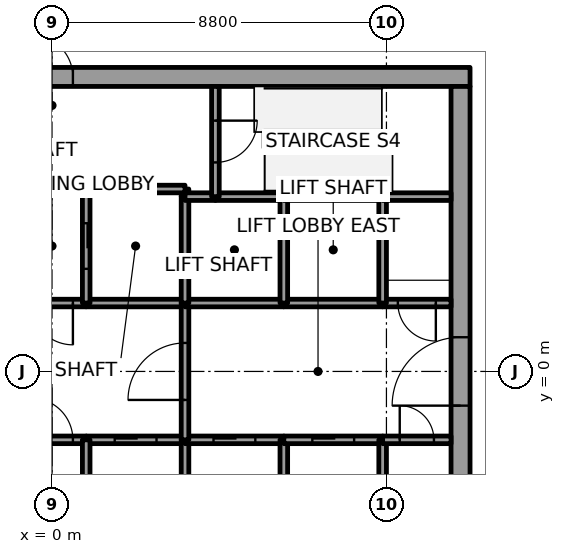
"""IFC4 building model, lengths in metres.
Left out: names, types, materials, properties, quantities, classifications, styles, units other than length and angle.
Written with IfcOpenShell. Run it as: python <this file> out.ifc"""

import sys

from ifc_helpers import new_model, si_unit, direction, frame, frame_2d, origin, place, context, subcontext, project, spatial, rectangle, extrude, element, fill, save


model = new_model("IFC4")
c1 = context("Model", 3, precision=1e-05, world=origin(), true_north=direction((0.0, 1.0)))
c2 = subcontext(c1, "Body", "Model", "MODEL_VIEW")
j1 = project(units=[si_unit("LENGTHUNIT", "METRE"), si_unit("PLANEANGLEUNIT", "RADIAN")], contexts=[c1])
p1 = place(None, origin())
s1 = spatial("IfcSite", under=j1, at=p1, CompositionType="ELEMENT")
p2 = place(p1, origin())
s2 = spatial("IfcBuilding", under=s1, at=p2, CompositionType="ELEMENT")
p3 = place(p2, frame((0.0, 0.0, 133.8)))
s3 = spatial("IfcBuildingStorey", under=s2, at=p3, CompositionType="ELEMENT", Elevation=133.8)
p4 = place(p3, frame((-11.0, 7.75, 0.0), z_axis=(0.0, 0.0, 1.0), x_axis=(1.0, 0.0, 0.0)))
e1 = element("IfcWall", 1, at=p4, inside=s3, PredefinedType="SHEAR", context=c2, shape_type="SweptSolid", body=[
    extrude(rectangle(XDim=22.0, YDim=0.5, at=frame_2d((11.0, 0.0))), origin(), (0.0, 0.0, 1.0), 4.0),
])
p5 = place(p4, frame((10.45, 0.0, 0.0)))
e2 = element("IfcOpeningElement", 2, at=p5, cuts=e1, PredefinedType="OPENING", context=c2, shape_type="SweptSolid", body=[
    extrude(rectangle(XDim=1.1, YDim=2.1, at=frame_2d((0.55, 1.05))), frame((0.0, 0.25, 0.0), z_axis=(0.0, -1.0, 0.0), x_axis=(1.0, 0.0, 0.0)), (0.0, 0.0, 1.0), 0.5),
])
p6 = place(p3, frame((10.75, -7.5, 0.0), z_axis=(0.0, 0.0, 1.0), x_axis=(0.0, 1.0, 0.0)))
e3 = element("IfcWall", 3, at=p6, inside=s3, PredefinedType="SHEAR", context=c2, shape_type="SweptSolid", body=[
    extrude(rectangle(XDim=15.0, YDim=0.5, at=frame_2d((7.5, 0.0))), origin(), (0.0, 0.0, 1.0), 4.0),
])
p7 = place(p6, frame((6.6, 0.0, 0.0)))
e4 = element("IfcOpeningElement", 4, at=p7, cuts=e3, PredefinedType="OPENING", context=c2, shape_type="SweptSolid", body=[
    extrude(rectangle(XDim=1.8, YDim=2.1, at=frame_2d((0.9, 1.05))), frame((0.0, 0.25, 0.0), z_axis=(0.0, -1.0, 0.0), x_axis=(1.0, 0.0, 0.0)), (0.0, 0.0, 1.0), 0.5),
])
p8 = place(p3, frame((-0.9, -1.8, 0.0), z_axis=(0.0, 0.0, 1.0), x_axis=(1.0, 0.0, 0.0)))
e5 = element("IfcWall", 5, at=p8, inside=s3, PredefinedType="SOLIDWALL", context=c2, shape_type="SweptSolid", body=[
    extrude(rectangle(XDim=1.8, YDim=0.2, at=frame_2d((0.9, 0.0))), origin(), (0.0, 0.0, 1.0), 3.85),
])
p9 = place(p8, frame((0.35, 0.0, 0.0)))
e6 = element("IfcOpeningElement", 6, at=p9, cuts=e5, PredefinedType="OPENING", context=c2, shape_type="SweptSolid", body=[
    extrude(rectangle(XDim=1.1, YDim=2.1, at=frame_2d((0.55, 1.05))), frame((0.0, 0.1, 0.0), z_axis=(0.0, -1.0, 0.0), x_axis=(1.0, 0.0, 0.0)), (0.0, 0.0, 1.0), 0.2),
])
p10 = place(p3, frame((0.9, 1.8, 0.0), z_axis=(0.0, 0.0, 1.0), x_axis=(-1.0, 0.0, 0.0)))
e7 = element("IfcWall", 7, at=p10, inside=s3, PredefinedType="SOLIDWALL", context=c2, shape_type="SweptSolid", body=[
    extrude(rectangle(XDim=1.8, YDim=0.2, at=frame_2d((0.9, 0.0))), origin(), (0.0, 0.0, 1.0), 3.85),
])
p11 = place(p10, frame((0.35, 0.0, 0.0)))
e8 = element("IfcOpeningElement", 8, at=p11, cuts=e7, PredefinedType="OPENING", context=c2, shape_type="SweptSolid", body=[
    extrude(rectangle(XDim=1.1, YDim=2.1, at=frame_2d((0.55, 1.05))), frame((0.0, 0.1, 0.0), z_axis=(0.0, -1.0, 0.0), x_axis=(1.0, 0.0, 0.0)), (0.0, 0.0, 1.0), 0.2),
])
p12 = place(p3, frame((0.9, -1.8, 0.0), z_axis=(0.0, 0.0, 1.0), x_axis=(1.0, 0.0, 0.0)))
e9 = element("IfcWall", 9, at=p12, inside=s3, PredefinedType="SOLIDWALL", context=c2, shape_type="SweptSolid", body=[
    extrude(rectangle(XDim=2.6, YDim=0.2, at=frame_2d((1.3, 0.0))), origin(), (0.0, 0.0, 1.0), 3.85),
])
p13 = place(p12, frame((0.75, 0.0, 0.0)))
e10 = element("IfcOpeningElement", 10, at=p13, cuts=e9, PredefinedType="OPENING", context=c2, shape_type="SweptSolid", body=[
    extrude(rectangle(XDim=1.1, YDim=2.1, at=frame_2d((0.55, 1.05))), frame((0.0, 0.1, 0.0), z_axis=(0.0, -1.0, 0.0), x_axis=(1.0, 0.0, 0.0)), (0.0, 0.0, 1.0), 0.2),
])
p14 = place(p3, frame((0.9, -1.8, 0.0), z_axis=(0.0, 0.0, 1.0), x_axis=(0.0, -1.0, 0.0)))
e11 = element("IfcWall", 11, at=p14, inside=s3, PredefinedType="SOLIDWALL", context=c2, shape_type="SweptSolid", body=[
    extrude(rectangle(XDim=2.8, YDim=0.2, at=frame_2d((1.4, 0.0))), origin(), (0.0, 0.0, 1.0), 3.85),
])
p15 = place(p3, frame((3.5, 1.8, 0.0), z_axis=(0.0, 0.0, 1.0), x_axis=(-1.0, 0.0, 0.0)))
e12 = element("IfcWall", 12, at=p15, inside=s3, PredefinedType="SOLIDWALL", context=c2, shape_type="SweptSolid", body=[
    extrude(rectangle(XDim=2.6, YDim=0.2, at=frame_2d((1.3, 0.0))), origin(), (0.0, 0.0, 1.0), 3.85),
])
p16 = place(p3, frame((3.5, 4.6, 0.0), z_axis=(0.0, 0.0, 1.0), x_axis=(0.0, 1.0, 0.0)))
e13 = element("IfcWall", 13, at=p16, inside=s3, PredefinedType="SOLIDWALL", context=c2, shape_type="SweptSolid", body=[
    extrude(rectangle(XDim=0.2, YDim=0.2, at=frame_2d((0.1, 0.0))), origin(), (0.0, 0.0, 1.0), 3.85),
])
p17 = place(p3, frame((3.5, 4.8, 0.0), z_axis=(0.0, 0.0, 1.0), x_axis=(-1.0, 0.0, 0.0)))
e14 = element("IfcWall", 14, at=p17, inside=s3, PredefinedType="SOLIDWALL", context=c2, shape_type="SweptSolid", body=[
    extrude(rectangle(XDim=2.6, YDim=0.2, at=frame_2d((1.3, 0.0))), origin(), (0.0, 0.0, 1.0), 3.85),
])
p18 = place(p3, frame((0.9, 4.8, 0.0), z_axis=(0.0, 0.0, 1.0), x_axis=(0.0, -1.0, 0.0)))
e15 = element("IfcWall", 15, at=p18, inside=s3, PredefinedType="SOLIDWALL", context=c2, shape_type="SweptSolid", body=[
    extrude(rectangle(XDim=3.0, YDim=0.2, at=frame_2d((1.5, 0.0))), origin(), (0.0, 0.0, 1.0), 3.85),
])
p19 = place(p18, frame((0.9, 0.0, 0.0)))
e16 = element("IfcOpeningElement", 16, at=p19, cuts=e15, PredefinedType="OPENING", context=c2, shape_type="SweptSolid", body=[
    extrude(rectangle(XDim=1.2, YDim=2.1, at=frame_2d((0.6, 1.05))), frame((0.0, 0.1, 0.0), z_axis=(0.0, -1.0, 0.0), x_axis=(1.0, 0.0, 0.0)), (0.0, 0.0, 1.0), 0.2),
])
p20 = place(p3, frame((3.5, -4.6, 0.0), z_axis=(0.0, 0.0, 1.0), x_axis=(0.0, 1.0, 0.0)))
e17 = element("IfcWall", 17, at=p20, inside=s3, PredefinedType="SOLIDWALL", context=c2, shape_type="SweptSolid", body=[
    extrude(rectangle(XDim=2.8, YDim=0.2, at=frame_2d((1.4, 0.0))), origin(), (0.0, 0.0, 1.0), 3.85),
])
p21 = place(p3, frame((3.5, -1.8, 0.0), z_axis=(0.0, 0.0, 1.0), x_axis=(1.0, 0.0, 0.0)))
e18 = element("IfcWall", 18, at=p21, inside=s3, PredefinedType="SOLIDWALL", context=c2, shape_type="SweptSolid", body=[
    extrude(rectangle(XDim=2.6, YDim=0.2, at=frame_2d((1.3, 0.0))), origin(), (0.0, 0.0, 1.0), 3.85),
])
p22 = place(p21, frame((0.75, 0.0, 0.0)))
e19 = element("IfcOpeningElement", 19, at=p22, cuts=e18, PredefinedType="OPENING", context=c2, shape_type="SweptSolid", body=[
    extrude(rectangle(XDim=1.1, YDim=2.1, at=frame_2d((0.55, 1.05))), frame((0.0, 0.1, 0.0), z_axis=(0.0, -1.0, 0.0), x_axis=(1.0, 0.0, 0.0)), (0.0, 0.0, 1.0), 0.2),
])
p23 = place(p3, frame((3.5, -1.8, 0.0), z_axis=(0.0, 0.0, 1.0), x_axis=(0.0, 1.0, 0.0)))
e20 = element("IfcWall", 20, at=p23, inside=s3, PredefinedType="SOLIDWALL", context=c2, shape_type="SweptSolid", body=[
    extrude(rectangle(XDim=3.6, YDim=0.2, at=frame_2d((1.8, 0.0))), origin(), (0.0, 0.0, 1.0), 3.85),
])
p24 = place(p23, frame((1.05, 0.0, 0.0)))
e21 = element("IfcOpeningElement", 21, at=p24, cuts=e20, PredefinedType="OPENING", context=c2, shape_type="SweptSolid", body=[
    extrude(rectangle(XDim=1.5, YDim=2.1, at=frame_2d((0.75, 1.05))), frame((0.0, 0.1, 0.0), z_axis=(0.0, -1.0, 0.0), x_axis=(1.0, 0.0, 0.0)), (0.0, 0.0, 1.0), 0.2),
])
p25 = place(p3, frame((6.1, 1.8, 0.0), z_axis=(0.0, 0.0, 1.0), x_axis=(-1.0, 0.0, 0.0)))
e22 = element("IfcWall", 22, at=p25, inside=s3, PredefinedType="SOLIDWALL", context=c2, shape_type="SweptSolid", body=[
    extrude(rectangle(XDim=2.6, YDim=0.2, at=frame_2d((1.3, 0.0))), origin(), (0.0, 0.0, 1.0), 3.85),
])
p26 = place(p3, frame((3.5, 1.8, 0.0), z_axis=(0.0, 0.0, 1.0), x_axis=(0.0, 1.0, 0.0)))
e23 = element("IfcWall", 23, at=p26, inside=s3, PredefinedType="SOLIDWALL", context=c2, shape_type="SweptSolid", body=[
    extrude(rectangle(XDim=2.8, YDim=0.2, at=frame_2d((1.4, 0.0))), origin(), (0.0, 0.0, 1.0), 3.85),
])
p27 = place(p3, frame((4.3, 4.6, 0.0), z_axis=(0.0, 0.0, 1.0), x_axis=(-1.0, 0.0, 0.0)))
e24 = element("IfcWall", 24, at=p27, inside=s3, PredefinedType="SOLIDWALL", context=c2, shape_type="SweptSolid", body=[
    extrude(rectangle(XDim=0.8, YDim=0.2, at=frame_2d((0.4, 0.0))), origin(), (0.0, 0.0, 1.0), 3.85),
])
p28 = place(p3, frame((6.1, 4.6, 0.0), z_axis=(0.0, 0.0, 1.0), x_axis=(-1.0, 0.0, 0.0)))
e25 = element("IfcWall", 25, at=p28, inside=s3, PredefinedType="SOLIDWALL", context=c2, shape_type="SweptSolid", body=[
    extrude(rectangle(XDim=1.8, YDim=0.2, at=frame_2d((0.9, 0.0))), origin(), (0.0, 0.0, 1.0), 3.85),
])
p29 = place(p3, frame((4.3, 7.5, 0.0), z_axis=(0.0, 0.0, 1.0), x_axis=(0.0, -1.0, 0.0)))
e26 = element("IfcWall", 26, at=p29, inside=s3, PredefinedType="SOLIDWALL", context=c2, shape_type="SweptSolid", body=[
    extrude(rectangle(XDim=2.9, YDim=0.2, at=frame_2d((1.45, 0.0))), origin(), (0.0, 0.0, 1.0), 3.85),
])
p30 = place(p29, frame((0.9, 0.0, 0.0)))
e27 = element("IfcOpeningElement", 27, at=p30, cuts=e26, PredefinedType="OPENING", context=c2, shape_type="SweptSolid", body=[
    extrude(rectangle(XDim=1.1, YDim=2.1, at=frame_2d((0.55, 1.05))), frame((0.0, 0.1, 0.0), z_axis=(0.0, -1.0, 0.0), x_axis=(1.0, 0.0, 0.0)), (0.0, 0.0, 1.0), 0.2),
])
p31 = place(p3, frame((6.1, -4.6, 0.0), z_axis=(0.0, 0.0, 1.0), x_axis=(0.0, 1.0, 0.0)))
e28 = element("IfcWall", 28, at=p31, inside=s3, PredefinedType="SOLIDWALL", context=c2, shape_type="SweptSolid", body=[
    extrude(rectangle(XDim=2.8, YDim=0.2, at=frame_2d((1.4, 0.0))), origin(), (0.0, 0.0, 1.0), 3.85),
])
p32 = place(p3, frame((6.1, -1.8, 0.0), z_axis=(0.0, 0.0, 1.0), x_axis=(1.0, 0.0, 0.0)))
e29 = element("IfcWall", 29, at=p32, inside=s3, PredefinedType="SOLIDWALL", context=c2, shape_type="SweptSolid", body=[
    extrude(rectangle(XDim=2.6, YDim=0.2, at=frame_2d((1.3, 0.0))), origin(), (0.0, 0.0, 1.0), 3.85),
])
p33 = place(p32, frame((0.75, 0.0, 0.0)))
e30 = element("IfcOpeningElement", 30, at=p33, cuts=e29, PredefinedType="OPENING", context=c2, shape_type="SweptSolid", body=[
    extrude(rectangle(XDim=1.1, YDim=2.1, at=frame_2d((0.55, 1.05))), frame((0.0, 0.1, 0.0), z_axis=(0.0, -1.0, 0.0), x_axis=(1.0, 0.0, 0.0)), (0.0, 0.0, 1.0), 0.2),
])
p34 = place(p3, frame((8.7, 1.8, 0.0), z_axis=(0.0, 0.0, 1.0), x_axis=(-1.0, 0.0, 0.0)))
e31 = element("IfcWall", 31, at=p34, inside=s3, PredefinedType="SOLIDWALL", context=c2, shape_type="SweptSolid", body=[
    extrude(rectangle(XDim=2.6, YDim=0.2, at=frame_2d((1.3, 0.0))), origin(), (0.0, 0.0, 1.0), 3.85),
])
p35 = place(p3, frame((6.1, 1.8, 0.0), z_axis=(0.0, 0.0, 1.0), x_axis=(0.0, 1.0, 0.0)))
e32 = element("IfcWall", 32, at=p35, inside=s3, PredefinedType="SOLIDWALL", context=c2, shape_type="SweptSolid", body=[
    extrude(rectangle(XDim=2.8, YDim=0.2, at=frame_2d((1.4, 0.0))), origin(), (0.0, 0.0, 1.0), 3.85),
])
p36 = place(p3, frame((8.7, 4.6, 0.0), z_axis=(0.0, 0.0, 1.0), x_axis=(-1.0, 0.0, 0.0)))
e33 = element("IfcWall", 33, at=p36, inside=s3, PredefinedType="SOLIDWALL", context=c2, shape_type="SweptSolid", body=[
    extrude(rectangle(XDim=2.6, YDim=0.2, at=frame_2d((1.3, 0.0))), origin(), (0.0, 0.0, 1.0), 3.85),
])
p37 = place(p3, frame((8.7, -1.8, 0.0), z_axis=(0.0, 0.0, 1.0), x_axis=(0.0, -1.0, 0.0)))
e34 = element("IfcWall", 34, at=p37, inside=s3, PredefinedType="SOLIDWALL", context=c2, shape_type="SweptSolid", body=[
    extrude(rectangle(XDim=2.8, YDim=0.2, at=frame_2d((1.4, 0.0))), origin(), (0.0, 0.0, 1.0), 3.85),
])
p38 = place(p3, frame((8.7, -1.8, 0.0), z_axis=(0.0, 0.0, 1.0), x_axis=(1.0, 0.0, 0.0)))
e35 = element("IfcWall", 35, at=p38, inside=s3, PredefinedType="SOLIDWALL", context=c2, shape_type="SweptSolid", body=[
    extrude(rectangle(XDim=1.8, YDim=0.2, at=frame_2d((0.9, 0.0))), origin(), (0.0, 0.0, 1.0), 3.85),
])
p39 = place(p38, frame((0.45, 0.0, 0.0)))
e36 = element("IfcOpeningElement", 36, at=p39, cuts=e35, PredefinedType="OPENING", context=c2, shape_type="SweptSolid", body=[
    extrude(rectangle(XDim=0.9, YDim=2.1, at=frame_2d((0.45, 1.05))), frame((0.0, 0.1, 0.0), z_axis=(0.0, -1.0, 0.0), x_axis=(1.0, 0.0, 0.0)), (0.0, 0.0, 1.0), 0.2),
])
p40 = place(p3, frame((10.5, 1.8, 0.0), z_axis=(0.0, 0.0, 1.0), x_axis=(-1.0, 0.0, 0.0)))
e37 = element("IfcWall", 37, at=p40, inside=s3, PredefinedType="SOLIDWALL", context=c2, shape_type="SweptSolid", body=[
    extrude(rectangle(XDim=1.8, YDim=0.2, at=frame_2d((0.9, 0.0))), origin(), (0.0, 0.0, 1.0), 3.85),
])
p41 = place(p40, frame((0.4, 0.0, 0.0)))
e38 = element("IfcOpeningElement", 38, at=p41, cuts=e37, PredefinedType="OPENING", context=c2, shape_type="SweptSolid", body=[
    extrude(rectangle(XDim=1.0, YDim=2.1, at=frame_2d((0.5, 1.05))), frame((0.0, 0.1, 0.0), z_axis=(0.0, -1.0, 0.0), x_axis=(1.0, 0.0, 0.0)), (0.0, 0.0, 1.0), 0.2),
])
p42 = place(p3, frame((8.7, 4.6, 0.0), z_axis=(0.0, 0.0, 1.0), x_axis=(0.0, -1.0, 0.0)))
e39 = element("IfcWall", 39, at=p42, inside=s3, PredefinedType="SOLIDWALL", context=c2, shape_type="SweptSolid", body=[
    extrude(rectangle(XDim=2.8, YDim=0.2, at=frame_2d((1.4, 0.0))), origin(), (0.0, 0.0, 1.0), 3.85),
])
p43 = place(p3, frame((10.5, 4.6, 0.0), z_axis=(0.0, 0.0, 1.0), x_axis=(-1.0, 0.0, 0.0)))
e40 = element("IfcWall", 40, at=p43, inside=s3, PredefinedType="SOLIDWALL", context=c2, shape_type="SweptSolid", body=[
    extrude(rectangle(XDim=1.8, YDim=0.2, at=frame_2d((0.9, 0.0))), origin(), (0.0, 0.0, 1.0), 3.85),
])
p44 = place(p13, origin())
e41 = element("IfcDoor", 41, at=p44, inside=s3, OperationType="SLIDING_TO_LEFT", PredefinedType="DOOR", context=c2, shape_type="SweptSolid", body=[
    extrude(rectangle(XDim=1.1, YDim=2.1, at=frame_2d((0.55, 1.05))), frame((0.0, 0.025, 0.0), z_axis=(0.0, -1.0, 0.0), x_axis=(1.0, 0.0, 0.0)), (0.0, 0.0, 1.0), 0.05),
])
fill(e10, e41)
p45 = place(p22, origin())
e42 = element("IfcDoor", 42, at=p45, inside=s3, OperationType="SLIDING_TO_LEFT", PredefinedType="DOOR", context=c2, shape_type="SweptSolid", body=[
    extrude(rectangle(XDim=1.1, YDim=2.1, at=frame_2d((0.55, 1.05))), frame((0.0, 0.025, 0.0), z_axis=(0.0, -1.0, 0.0), x_axis=(1.0, 0.0, 0.0)), (0.0, 0.0, 1.0), 0.05),
])
fill(e19, e42)
p46 = place(p33, origin())
e43 = element("IfcDoor", 43, at=p46, inside=s3, OperationType="SLIDING_TO_LEFT", PredefinedType="DOOR", context=c2, shape_type="SweptSolid", body=[
    extrude(rectangle(XDim=1.1, YDim=2.1, at=frame_2d((0.55, 1.05))), frame((0.0, 0.025, 0.0), z_axis=(0.0, -1.0, 0.0), x_axis=(1.0, 0.0, 0.0)), (0.0, 0.0, 1.0), 0.05),
])
fill(e30, e43)
p47 = place(p19, origin())
e44 = element("IfcDoor", 44, at=p47, inside=s3, OperationType="SLIDING_TO_LEFT", PredefinedType="DOOR", context=c2, shape_type="SweptSolid", body=[
    extrude(rectangle(XDim=1.2, YDim=2.1, at=frame_2d((0.6, 1.05))), frame((0.0, 0.025, 0.0), z_axis=(0.0, -1.0, 0.0), x_axis=(1.0, 0.0, 0.0)), (0.0, 0.0, 1.0), 0.05),
])
fill(e16, e44)
p48 = place(p24, origin())
e45 = element("IfcDoor", 45, at=p48, inside=s3, OperationType="DOUBLE_DOOR_SINGLE_SWING", PredefinedType="DOOR", context=c2, shape_type="SweptSolid", body=[
    extrude(rectangle(XDim=1.5, YDim=2.1, at=frame_2d((0.75, 1.05))), frame((0.0, 0.025, 0.0), z_axis=(0.0, -1.0, 0.0), x_axis=(1.0, 0.0, 0.0)), (0.0, 0.0, 1.0), 0.05),
])
fill(e21, e45)
p49 = place(p11, origin())
e46 = element("IfcDoor", 46, at=p49, inside=s3, OperationType="SINGLE_SWING_RIGHT", PredefinedType="DOOR", context=c2, shape_type="SweptSolid", body=[
    extrude(rectangle(XDim=1.1, YDim=2.1, at=frame_2d((0.55, 1.05))), frame((0.0, 0.025, 0.0), z_axis=(0.0, -1.0, 0.0), x_axis=(1.0, 0.0, 0.0)), (0.0, 0.0, 1.0), 0.05),
])
fill(e8, e46)
p50 = place(p9, origin())
e47 = element("IfcDoor", 47, at=p50, inside=s3, OperationType="SINGLE_SWING_RIGHT", PredefinedType="DOOR", context=c2, shape_type="SweptSolid", body=[
    extrude(rectangle(XDim=1.1, YDim=2.1, at=frame_2d((0.55, 1.05))), frame((0.0, 0.025, 0.0), z_axis=(0.0, -1.0, 0.0), x_axis=(1.0, 0.0, 0.0)), (0.0, 0.0, 1.0), 0.05),
])
fill(e6, e47)
p51 = place(p41, origin())
e48 = element("IfcDoor", 48, at=p51, inside=s3, OperationType="SINGLE_SWING_RIGHT", PredefinedType="DOOR", context=c2, shape_type="SweptSolid", body=[
    extrude(rectangle(XDim=1.0, YDim=2.1, at=frame_2d((0.5, 1.05))), frame((0.0, 0.025, 0.0), z_axis=(0.0, -1.0, 0.0), x_axis=(1.0, 0.0, 0.0)), (0.0, 0.0, 1.0), 0.05),
])
fill(e38, e48)
p52 = place(p30, origin())
e49 = element("IfcDoor", 49, at=p52, inside=s3, OperationType="SINGLE_SWING_RIGHT", PredefinedType="DOOR", context=c2, shape_type="SweptSolid", body=[
    extrude(rectangle(XDim=1.1, YDim=2.1, at=frame_2d((0.55, 1.05))), frame((0.0, 0.025, 0.0), z_axis=(0.0, -1.0, 0.0), x_axis=(1.0, 0.0, 0.0)), (0.0, 0.0, 1.0), 0.05),
])
fill(e27, e49)
p53 = place(p39, origin())
e50 = element("IfcDoor", 50, at=p53, inside=s3, OperationType="SINGLE_SWING_RIGHT", PredefinedType="DOOR", context=c2, shape_type="SweptSolid", body=[
    extrude(rectangle(XDim=0.9, YDim=2.1, at=frame_2d((0.45, 1.05))), frame((0.0, 0.025, 0.0), z_axis=(0.0, -1.0, 0.0), x_axis=(1.0, 0.0, 0.0)), (0.0, 0.0, 1.0), 0.05),
])
fill(e36, e50)
p54 = place(p7, origin())
e51 = element("IfcDoor", 51, at=p54, inside=s3, OperationType="DOUBLE_DOOR_SINGLE_SWING", PredefinedType="DOOR", context=c2, shape_type="SweptSolid", body=[
    extrude(rectangle(XDim=1.8, YDim=2.1, at=frame_2d((0.9, 1.05))), frame((0.0, 0.025, 0.0), z_axis=(0.0, -1.0, 0.0), x_axis=(1.0, 0.0, 0.0)), (0.0, 0.0, 1.0), 0.05),
])
fill(e4, e51)
p55 = place(p5, origin())
e52 = element("IfcDoor", 52, at=p55, inside=s3, OperationType="SINGLE_SWING_RIGHT", PredefinedType="DOOR", context=c2, shape_type="SweptSolid", body=[
    extrude(rectangle(XDim=1.1, YDim=2.1, at=frame_2d((0.55, 1.05))), frame((0.0, 0.025, 0.0), z_axis=(0.0, -1.0, 0.0), x_axis=(1.0, 0.0, 0.0)), (0.0, 0.0, 1.0), 0.05),
])
fill(e2, e52)
save(model, sys.argv[1])
